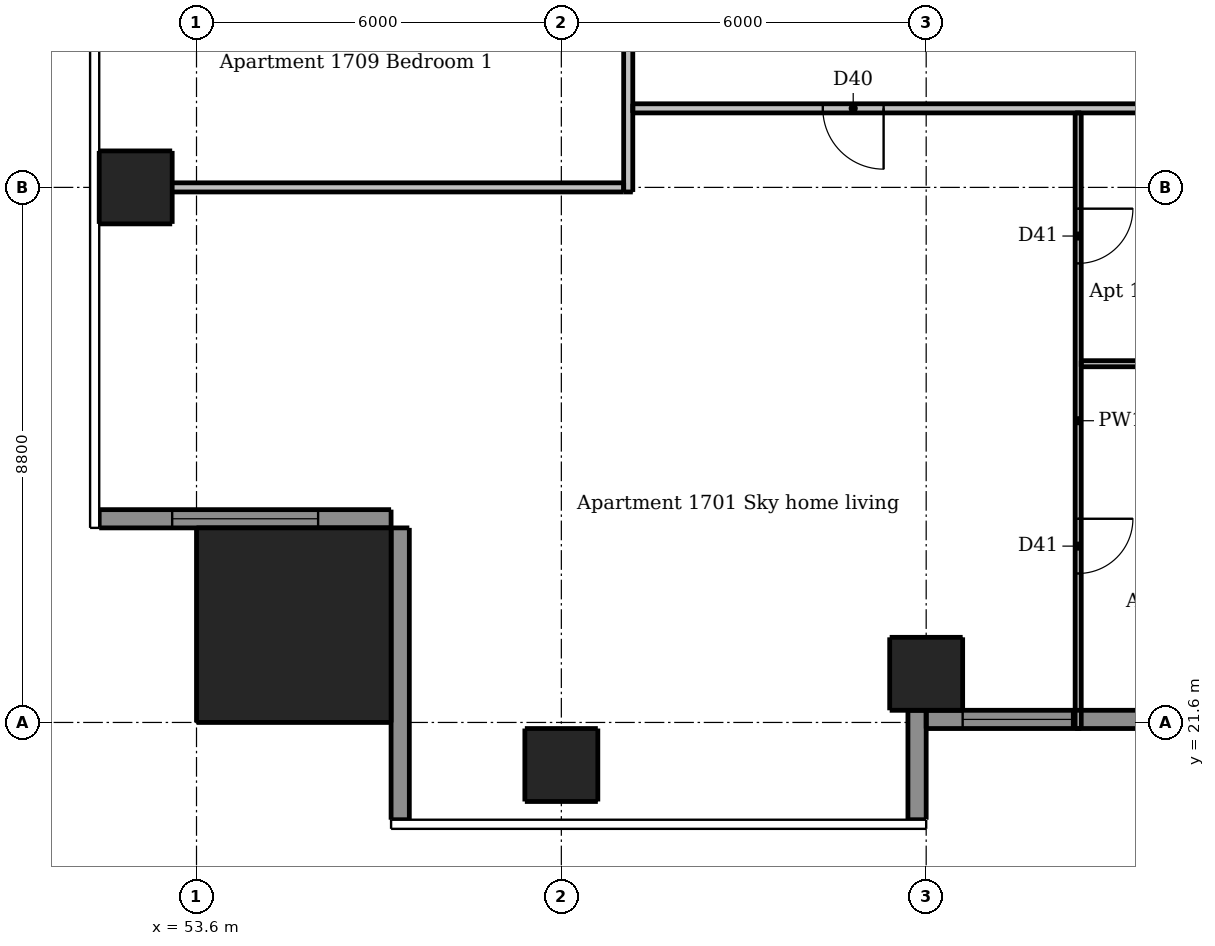
"""IFC4 building model, lengths in metres.
Left out: names, types, materials, properties, quantities, classifications, styles, units other than length and angle.
Written with IfcOpenShell. Run it as: python <this file> out.ifc"""

import sys

from ifc_helpers import new_model, si_unit, direction, frame, frame_2d, origin, origin_2d, place, context, subcontext, project, spatial, rectangle, extrude, element, fill, save


model = new_model("IFC4")
c1 = context("Model", 3, precision=1e-05, world=origin(), true_north=direction((0.0, 1.0)))
c2 = subcontext(c1, "Body", "Model", "MODEL_VIEW")
j1 = project(units=[si_unit("LENGTHUNIT", "METRE"), si_unit("PLANEANGLEUNIT", "RADIAN")], contexts=[c1])
p1 = place(None, origin())
s1 = spatial("IfcSite", under=j1, at=p1, CompositionType="ELEMENT")
p2 = place(p1, origin())
s2 = spatial("IfcBuilding", under=s1, at=p2, CompositionType="ELEMENT")
p3 = place(p2, frame((0.0, 0.0, 63.1)))
s3 = spatial("IfcBuildingStorey", under=s2, at=p3, CompositionType="ELEMENT", Elevation=63.1)
for number, where, z_axis, x_axis in (
    (1, (59.6, 20.9, 0.0), (0.0, 0.0, 1.0), (1.0, 0.0, 0.0)),
    (2, (65.6, 22.4, 0.0), (0.0, 0.0, 1.0), (1.0, 0.0, 0.0)),
    (3, (52.6, 30.4, 0.0), (0.0, 0.0, 1.0), (1.0, 0.0, 0.0)),
):
    element("IfcColumn", number, at=place(p3, frame(where, z_axis=z_axis, x_axis=x_axis)), inside=s3, PredefinedType="COLUMN", context=c2, shape_type="SweptSolid", body=[
        extrude(rectangle(XDim=1.2, YDim=1.2, at=origin_2d()), origin(), (0.0, 0.0, 1.0), 3.05),
    ])
p4 = place(p3, frame((55.2, 23.2, 0.0), z_axis=(0.0, 0.0, 1.0), x_axis=(1.0, 0.0, 0.0)))
e4 = element("IfcColumn", 4, at=p4, inside=s3, PredefinedType="COLUMN", context=c2, shape_type="SweptSolid", body=[
    extrude(rectangle(XDim=3.2, YDim=3.2, at=origin_2d()), origin(), (0.0, 0.0, 1.0), 3.3),
])
p5 = place(p3, frame((65.45, 20.0, 0.0), z_axis=(0.0, 0.0, 1.0), x_axis=(0.0, 1.0, 0.0)))
e5 = element("IfcWall", 5, at=p5, inside=s3, PredefinedType="SOLIDWALL", context=c2, shape_type="SweptSolid", body=[
    extrude(rectangle(XDim=1.8, YDim=0.3, at=frame_2d((0.9, 0.0))), origin(), (0.0, 0.0, 1.0), 3.05),
])
p6 = place(p3, frame((52.0, 24.95, 0.0), z_axis=(0.0, 0.0, 1.0), x_axis=(1.0, 0.0, 0.0)))
e6 = element("IfcWall", 6, at=p6, inside=s3, PredefinedType="SOLIDWALL", context=c2, shape_type="SweptSolid", body=[
    extrude(rectangle(XDim=4.8, YDim=0.3, at=frame_2d((2.4, 0.0))), origin(), (0.0, 0.0, 1.0), 3.05),
])
p7 = place(p6, frame((1.2, 0.0, 0.15)))
e7 = element("IfcOpeningElement", 7, at=p7, cuts=e6, PredefinedType="OPENING", context=c2, shape_type="SweptSolid", body=[
    extrude(rectangle(XDim=2.4, YDim=2.1, at=frame_2d((1.2, 1.05))), frame((0.0, 0.16, 0.0), z_axis=(0.0, -1.0, 0.0), x_axis=(1.0, 0.0, 0.0)), (0.0, 0.0, 1.0), 0.32),
])
p8 = place(p3, frame((56.95, 24.8, 0.0), z_axis=(0.0, 0.0, 1.0), x_axis=(0.0, -1.0, 0.0)))
e8 = element("IfcWall", 8, at=p8, inside=s3, PredefinedType="SOLIDWALL", context=c2, shape_type="SweptSolid", body=[
    extrude(rectangle(XDim=4.8, YDim=0.3, at=frame_2d((2.4, 0.0))), origin(), (0.0, 0.0, 1.0), 3.05),
])
p9 = place(p3, frame((65.6, 21.65, 0.0), z_axis=(0.0, 0.0, 1.0), x_axis=(1.0, 0.0, 0.0)))
e9 = element("IfcWall", 9, at=p9, inside=s3, PredefinedType="SOLIDWALL", context=c2, shape_type="SweptSolid", body=[
    extrude(rectangle(XDim=6.0, YDim=0.3, at=frame_2d((3.0, 0.0))), origin(), (0.0, 0.0, 1.0), 3.05),
])
p10 = place(p9, frame((0.6, 0.0, 0.15)))
e10 = element("IfcOpeningElement", 10, at=p10, cuts=e9, PredefinedType="OPENING", context=c2, shape_type="SweptSolid", body=[
    extrude(rectangle(XDim=1.8, YDim=2.1, at=frame_2d((0.9, 1.05))), frame((0.0, 0.16, 0.0), z_axis=(0.0, -1.0, 0.0), x_axis=(1.0, 0.0, 0.0)), (0.0, 0.0, 1.0), 0.32),
])
p11 = place(p9, frame((3.6, 0.0, 0.15)))
e11 = element("IfcOpeningElement", 11, at=p11, cuts=e9, PredefinedType="OPENING", context=c2, shape_type="SweptSolid", body=[
    extrude(rectangle(XDim=1.8, YDim=2.1, at=frame_2d((0.9, 1.05))), frame((0.0, 0.16, 0.0), z_axis=(0.0, -1.0, 0.0), x_axis=(1.0, 0.0, 0.0)), (0.0, 0.0, 1.0), 0.32),
])
p12 = place(p3, frame((68.1, 31.625, 0.0), z_axis=(0.0, 0.0, 1.0), x_axis=(0.0, -1.0, 0.0)))
e12 = element("IfcWall", 12, at=p12, inside=s3, PredefinedType="PARTITIONING", context=c2, shape_type="SweptSolid", body=[
    extrude(rectangle(XDim=10.125, YDim=0.1, at=frame_2d((5.062, 0.0))), origin(), (0.0, 0.0, 1.0), 3.05),
])
p13 = place(p12, frame((1.575, 0.0, 0.0)))
e13 = element("IfcOpeningElement", 13, at=p13, cuts=e12, PredefinedType="OPENING", context=c2, shape_type="SweptSolid", body=[
    extrude(rectangle(XDim=0.9, YDim=2.1, at=frame_2d((0.45, 1.05))), frame((0.0, 0.06, 0.0), z_axis=(0.0, -1.0, 0.0), x_axis=(1.0, 0.0, 0.0)), (0.0, 0.0, 1.0), 0.12),
])
p14 = place(p12, frame((6.675, 0.0, 0.0)))
e14 = element("IfcOpeningElement", 14, at=p14, cuts=e12, PredefinedType="OPENING", context=c2, shape_type="SweptSolid", body=[
    extrude(rectangle(XDim=0.9, YDim=2.1, at=frame_2d((0.45, 1.05))), frame((0.0, 0.06, 0.0), z_axis=(0.0, -1.0, 0.0), x_axis=(1.0, 0.0, 0.0)), (0.0, 0.0, 1.0), 0.12),
])
p15 = place(p3, frame((68.15, 27.5, 0.0), z_axis=(0.0, 0.0, 1.0), x_axis=(1.0, 0.0, 0.0)))
e15 = element("IfcWall", 15, at=p15, inside=s3, PredefinedType="PARTITIONING", context=c2, shape_type="SweptSolid", body=[
    extrude(rectangle(XDim=6.375, YDim=0.1, at=frame_2d((3.188, 0.0))), origin(), (0.0, 0.0, 1.0), 3.05),
])
p16 = place(p15, frame((4.0, 0.0, 0.0)))
e16 = element("IfcOpeningElement", 16, at=p16, cuts=e15, PredefinedType="OPENING", context=c2, shape_type="SweptSolid", body=[
    extrude(rectangle(XDim=0.8, YDim=2.1, at=frame_2d((0.4, 1.05))), frame((0.0, 0.06, 0.0), z_axis=(0.0, -1.0, 0.0), x_axis=(1.0, 0.0, 0.0)), (0.0, 0.0, 1.0), 0.12),
])
p17 = place(p3, frame((60.7, 30.325, 0.0), z_axis=(0.0, 0.0, 1.0), x_axis=(0.0, 1.0, 0.0)))
e17 = element("IfcWall", 17, at=p17, inside=s3, PredefinedType="PARTITIONING", context=c2, shape_type="SweptSolid", body=[
    extrude(rectangle(XDim=28.9, YDim=0.15, at=frame_2d((14.45, 0.0))), origin(), (0.0, 0.0, 1.0), 3.05),
])
p18 = place(p17, frame((7.375, 0.0, 0.0)))
e18 = element("IfcOpeningElement", 18, at=p18, cuts=e17, PredefinedType="OPENING", context=c2, shape_type="SweptSolid", body=[
    extrude(rectangle(XDim=1.0, YDim=2.1, at=frame_2d((0.5, 1.05))), frame((0.0, 0.085, 0.0), z_axis=(0.0, -1.0, 0.0), x_axis=(1.0, 0.0, 0.0)), (0.0, 0.0, 1.0), 0.17),
])
p19 = place(p17, frame((14.575, 0.0, 0.0)))
e19 = element("IfcOpeningElement", 19, at=p19, cuts=e17, PredefinedType="OPENING", context=c2, shape_type="SweptSolid", body=[
    extrude(rectangle(XDim=1.0, YDim=2.1, at=frame_2d((0.5, 1.05))), frame((0.0, 0.085, 0.0), z_axis=(0.0, -1.0, 0.0), x_axis=(1.0, 0.0, 0.0)), (0.0, 0.0, 1.0), 0.17),
])
p20 = place(p17, frame((26.025, 0.0, 0.0)))
e20 = element("IfcOpeningElement", 20, at=p20, cuts=e17, PredefinedType="OPENING", context=c2, shape_type="SweptSolid", body=[
    extrude(rectangle(XDim=1.0, YDim=2.1, at=frame_2d((0.5, 1.05))), frame((0.0, 0.085, 0.0), z_axis=(0.0, -1.0, 0.0), x_axis=(1.0, 0.0, 0.0)), (0.0, 0.0, 1.0), 0.17),
])
p21 = place(p3, frame((89.525, 31.7, 0.0), z_axis=(0.0, 0.0, 1.0), x_axis=(-1.0, 0.0, 0.0)))
e21 = element("IfcWall", 21, at=p21, inside=s3, PredefinedType="PARTITIONING", context=c2, shape_type="SweptSolid", body=[
    extrude(rectangle(XDim=28.75, YDim=0.15, at=frame_2d((14.375, 0.0))), origin(), (0.0, 0.0, 1.0), 3.05),
])
p22 = place(p21, frame((24.625, 0.0, 0.0)))
e22 = element("IfcOpeningElement", 22, at=p22, cuts=e21, PredefinedType="OPENING", context=c2, shape_type="SweptSolid", body=[
    extrude(rectangle(XDim=1.0, YDim=2.1, at=frame_2d((0.5, 1.05))), frame((0.0, 0.085, 0.0), z_axis=(0.0, -1.0, 0.0), x_axis=(1.0, 0.0, 0.0)), (0.0, 0.0, 1.0), 0.17),
])
p23 = place(p21, frame((8.425, 0.0, 0.0)))
e23 = element("IfcOpeningElement", 23, at=p23, cuts=e21, PredefinedType="OPENING", context=c2, shape_type="SweptSolid", body=[
    extrude(rectangle(XDim=1.0, YDim=2.1, at=frame_2d((0.5, 1.05))), frame((0.0, 0.085, 0.0), z_axis=(0.0, -1.0, 0.0), x_axis=(1.0, 0.0, 0.0)), (0.0, 0.0, 1.0), 0.17),
])
p24 = place(p3, frame((52.0, 30.4, 0.0), z_axis=(0.0, 0.0, 1.0), x_axis=(1.0, 0.0, 0.0)))
e24 = element("IfcWall", 24, at=p24, inside=s3, PredefinedType="PARTITIONING", context=c2, shape_type="SweptSolid", body=[
    extrude(rectangle(XDim=8.625, YDim=0.15, at=frame_2d((4.312, 0.0))), origin(), (0.0, 0.0, 1.0), 2.647),
])
p25 = place(p7, origin())
e25 = element("IfcWindow", 25, at=p25, inside=s3, PartitioningType="DOUBLE_PANEL_VERTICAL", PredefinedType="WINDOW", context=c2, shape_type="SweptSolid", body=[
    extrude(rectangle(XDim=2.4, YDim=2.1, at=frame_2d((1.2, 1.05))), frame((0.0, 0.03, 0.0), z_axis=(0.0, -1.0, 0.0), x_axis=(1.0, 0.0, 0.0)), (0.0, 0.0, 1.0), 0.06),
])
fill(e7, e25)
p26 = place(p10, origin())
e26 = element("IfcWindow", 26, at=p26, inside=s3, PartitioningType="DOUBLE_PANEL_VERTICAL", PredefinedType="WINDOW", context=c2, shape_type="SweptSolid", body=[
    extrude(rectangle(XDim=1.8, YDim=2.1, at=frame_2d((0.9, 1.05))), frame((0.0, 0.03, 0.0), z_axis=(0.0, -1.0, 0.0), x_axis=(1.0, 0.0, 0.0)), (0.0, 0.0, 1.0), 0.06),
])
fill(e10, e26)
p27 = place(p22, origin())
e27 = element("IfcDoor", 27, at=p27, inside=s3, OperationType="SINGLE_SWING_LEFT", PredefinedType="DOOR", context=c2, shape_type="SweptSolid", body=[
    extrude(rectangle(XDim=1.0, YDim=2.1, at=frame_2d((0.5, 1.05))), frame((0.0, 0.025, 0.0), z_axis=(0.0, -1.0, 0.0), x_axis=(1.0, 0.0, 0.0)), (0.0, 0.0, 1.0), 0.05),
])
fill(e22, e27)
p28 = place(p13, origin())
e28 = element("IfcDoor", 28, at=p28, inside=s3, OperationType="SINGLE_SWING_LEFT", PredefinedType="DOOR", context=c2, shape_type="SweptSolid", body=[
    extrude(rectangle(XDim=0.9, YDim=2.1, at=frame_2d((0.45, 1.05))), frame((0.0, 0.025, 0.0), z_axis=(0.0, -1.0, 0.0), x_axis=(1.0, 0.0, 0.0)), (0.0, 0.0, 1.0), 0.05),
])
fill(e13, e28)
p29 = place(p14, origin())
e29 = element("IfcDoor", 29, at=p29, inside=s3, OperationType="SINGLE_SWING_LEFT", PredefinedType="DOOR", context=c2, shape_type="SweptSolid", body=[
    extrude(rectangle(XDim=0.9, YDim=2.1, at=frame_2d((0.45, 1.05))), frame((0.0, 0.025, 0.0), z_axis=(0.0, -1.0, 0.0), x_axis=(1.0, 0.0, 0.0)), (0.0, 0.0, 1.0), 0.05),
])
fill(e14, e29)
save(model, sys.argv[1])
